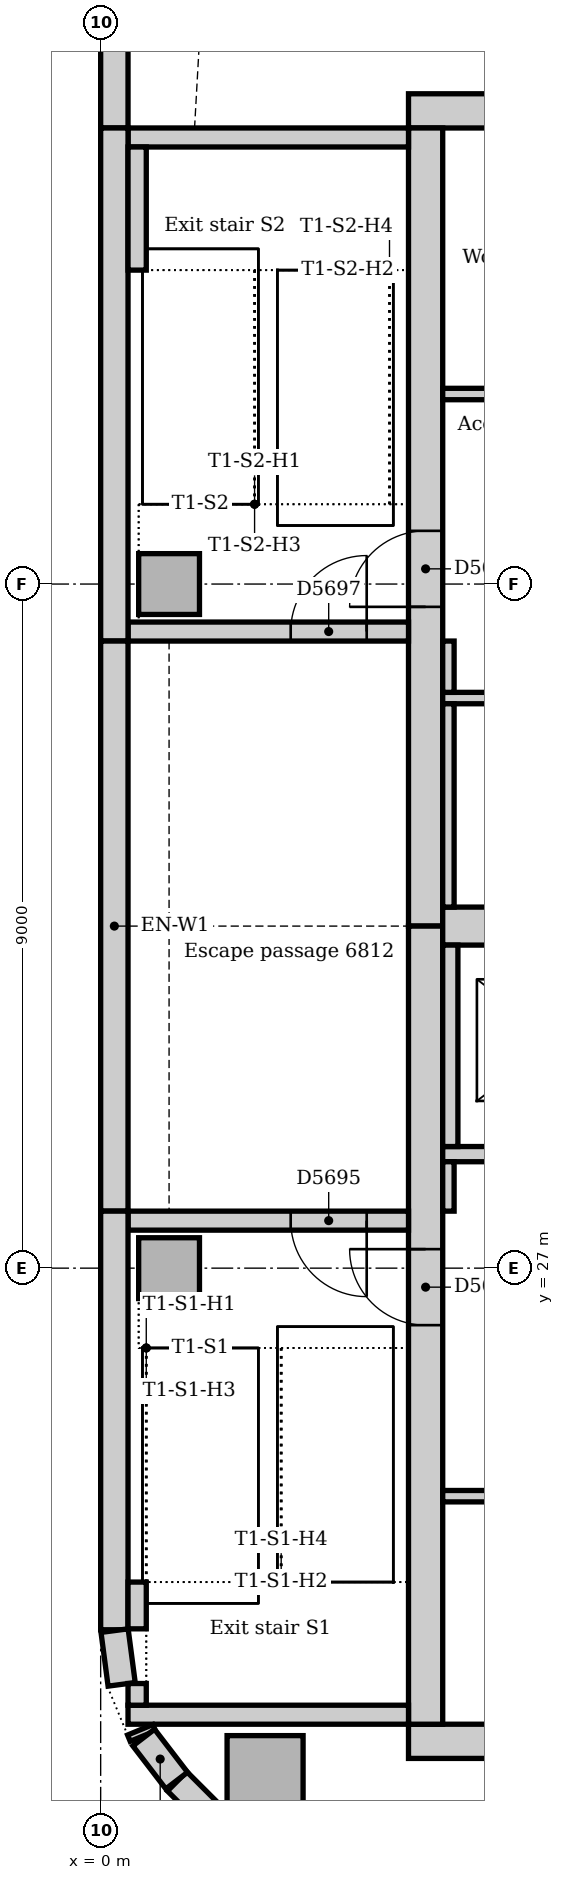
"""IFC4 building model, lengths in metres.
Left out: names, types, materials, properties, quantities, classifications, styles, units other than length and angle.
Written with IfcOpenShell. Run it as: python <this file> out.ifc"""

import sys

from ifc_helpers import new_model, si_unit, direction, frame, frame_2d, origin, origin_2d, place, context, subcontext, project, spatial, rectangle, extrude, element, fill, save


model = new_model("IFC4")
c1 = context("Model", 3, precision=1e-05, world=origin(), true_north=direction((0.0, 1.0)))
c2 = subcontext(c1, "Body", "Model", "MODEL_VIEW")
j1 = project(units=[si_unit("LENGTHUNIT", "METRE"), si_unit("PLANEANGLEUNIT", "RADIAN")], contexts=[c1])
p1 = place(None, origin())
s1 = spatial("IfcSite", under=j1, at=p1, CompositionType="ELEMENT")
p2 = place(p1, origin())
s2 = spatial("IfcBuilding", under=s1, at=p2, CompositionType="ELEMENT")
p3 = place(p2, frame((0.0, 0.0, 283.0)))
s3 = spatial("IfcBuildingStorey", under=s2, at=p3, CompositionType="ELEMENT", Elevation=283.0)
for number, where, z_axis, x_axis in (
    (1, (4.05, 20.775, 0.0), (0.0, 0.0, 1.0), (1.0, 0.0, 0.0)),
    (2, (22.95, 42.225, 0.0), (0.0, 0.0, 1.0), (-1.0, 0.0, 0.0)),
):
    element("IfcWall", number, at=place(p3, frame(where, z_axis=z_axis, x_axis=x_axis)), inside=s3, PredefinedType="SOLIDWALL", context=c2, shape_type="SweptSolid", body=[
        extrude(rectangle(XDim=18.9, YDim=0.45, at=frame_2d((9.45, 0.0))), origin(), (0.0, 0.0, 1.0), 8.0),
    ])
p4 = place(p3, frame((4.275, 42.0, 0.0), z_axis=(0.0, 0.0, 1.0), x_axis=(0.0, -1.0, 0.0)))
e3 = element("IfcWall", 3, at=p4, inside=s3, PredefinedType="SOLIDWALL", context=c2, shape_type="SweptSolid", body=[
    extrude(rectangle(XDim=10.5, YDim=0.45, at=frame_2d((5.25, 0.0))), origin(), (0.0, 0.0, 1.0), 8.0),
])
p5 = place(p4, frame((5.3, 0.0, 0.0)))
e4 = element("IfcOpeningElement", 4, at=p5, cuts=e3, PredefinedType="OPENING", context=c2, shape_type="SweptSolid", body=[
    extrude(rectangle(XDim=1.0, YDim=2.1, at=frame_2d((0.5, 1.05))), frame((0.0, 0.235, 0.0), z_axis=(0.0, -1.0, 0.0), x_axis=(1.0, 0.0, 0.0)), (0.0, 0.0, 1.0), 0.47),
])
p6 = place(p3, frame((4.275, 31.5, 0.0), z_axis=(0.0, 0.0, 1.0), x_axis=(0.0, -1.0, 0.0)))
e5 = element("IfcWall", 5, at=p6, inside=s3, PredefinedType="SOLIDWALL", context=c2, shape_type="SweptSolid", body=[
    extrude(rectangle(XDim=10.5, YDim=0.45, at=frame_2d((5.25, 0.0))), origin(), (0.0, 0.0, 1.0), 8.0),
])
p7 = place(p6, frame((4.25, 0.0, 0.0)))
e6 = element("IfcOpeningElement", 6, at=p7, cuts=e5, PredefinedType="OPENING", context=c2, shape_type="SweptSolid", body=[
    extrude(rectangle(XDim=1.0, YDim=2.1, at=frame_2d((0.5, 1.05))), frame((0.0, 0.235, 0.0), z_axis=(0.0, -1.0, 0.0), x_axis=(1.0, 0.0, 0.0)), (0.0, 0.0, 1.0), 0.47),
])
p8 = place(p3, frame((4.5, 31.5, 0.0), z_axis=(0.0, 0.0, 1.0), x_axis=(1.0, 0.0, 0.0)))
e7 = element("IfcWall", 7, at=p8, inside=s3, PredefinedType="SOLIDWALL", context=c2, shape_type="SweptSolid", body=[
    extrude(rectangle(XDim=18.0, YDim=0.5, at=frame_2d((9.0, 0.0))), origin(), (0.0, 0.0, 1.0), 8.0),
])
p9 = place(p3, frame((0.36, 21.125, 0.0), z_axis=(0.0, 0.0, 1.0), x_axis=(1.0, 0.0, 0.0)))
e8 = element("IfcWall", 8, at=p9, inside=s3, PredefinedType="SOLIDWALL", context=c2, shape_type="SweptSolid", body=[
    extrude(rectangle(XDim=3.69, YDim=0.25, at=frame_2d((1.845, 0.0))), origin(), (0.0, 0.0, 1.0), 8.0),
])
p10 = place(p3, frame((4.05, 27.625, 0.0), z_axis=(0.0, 0.0, 1.0), x_axis=(-1.0, 0.0, 0.0)))
e9 = element("IfcWall", 9, at=p10, inside=s3, PredefinedType="SOLIDWALL", context=c2, shape_type="SweptSolid", body=[
    extrude(rectangle(XDim=3.69, YDim=0.25, at=frame_2d((1.845, 0.0))), origin(), (0.0, 0.0, 1.0), 8.0),
])
p11 = place(p10, frame((0.55, 0.0, 0.0)))
e10 = element("IfcOpeningElement", 10, at=p11, cuts=e9, PredefinedType="OPENING", context=c2, shape_type="SweptSolid", body=[
    extrude(rectangle(XDim=1.0, YDim=2.1, at=frame_2d((0.5, 1.05))), frame((0.0, 0.135, 0.0), z_axis=(0.0, -1.0, 0.0), x_axis=(1.0, 0.0, 0.0)), (0.0, 0.0, 1.0), 0.27),
])
p12 = place(p3, frame((0.36, 35.375, 0.0), z_axis=(0.0, 0.0, 1.0), x_axis=(1.0, 0.0, 0.0)))
e11 = element("IfcWall", 11, at=p12, inside=s3, PredefinedType="SOLIDWALL", context=c2, shape_type="SweptSolid", body=[
    extrude(rectangle(XDim=3.69, YDim=0.25, at=frame_2d((1.845, 0.0))), origin(), (0.0, 0.0, 1.0), 8.0),
])
p13 = place(p12, frame((2.14, 0.0, 0.0)))
e12 = element("IfcOpeningElement", 12, at=p13, cuts=e11, PredefinedType="OPENING", context=c2, shape_type="SweptSolid", body=[
    extrude(rectangle(XDim=1.0, YDim=2.1, at=frame_2d((0.5, 1.05))), frame((0.0, 0.135, 0.0), z_axis=(0.0, -1.0, 0.0), x_axis=(1.0, 0.0, 0.0)), (0.0, 0.0, 1.0), 0.27),
])
p14 = place(p3, frame((4.05, 41.875, 0.0), z_axis=(0.0, 0.0, 1.0), x_axis=(-1.0, 0.0, 0.0)))
e13 = element("IfcWall", 13, at=p14, inside=s3, PredefinedType="SOLIDWALL", context=c2, shape_type="SweptSolid", body=[
    extrude(rectangle(XDim=3.69, YDim=0.25, at=frame_2d((1.845, 0.0))), origin(), (0.0, 0.0, 1.0), 8.0),
])
p15 = place(p3, frame((2.163, 20.35, 0.0), z_axis=(0.0, 0.0, 1.0), x_axis=(1.0, 0.0, 0.0)))
e14 = element("IfcColumn", 14, at=p15, inside=s3, PredefinedType="COLUMN", context=c2, shape_type="SweptSolid", body=[
    extrude(rectangle(XDim=1.0, YDim=1.0, at=origin_2d()), origin(), (0.0, 0.0, 1.0), 7.7),
])
for number, where, z_axis, x_axis in (
    (15, (0.9, 27.0, 0.0), (0.0, 0.0, 1.0), (1.0, 0.0, 0.0)),
    (16, (0.9, 36.0, 0.0), (0.0, 0.0, 1.0), (1.0, 0.0, 0.0)),
):
    element("IfcColumn", number, at=place(p3, frame(where, z_axis=z_axis, x_axis=x_axis)), inside=s3, PredefinedType="COLUMN", context=c2, shape_type="SweptSolid", body=[
        extrude(rectangle(XDim=0.8, YDim=0.8, at=origin_2d()), origin(), (0.0, 0.0, 1.0), 8.0),
    ])
p16 = place(p3, frame((0.18, 58.757, 0.0), z_axis=(0.0, 0.0, 1.0), x_axis=(0.0, -1.0, 0.0)))
e17 = element("IfcWall", 17, at=p16, inside=s3, PredefinedType="STANDARD", context=c2, shape_type="SweptSolid", body=[
    extrude(rectangle(XDim=16.757, YDim=0.36, at=frame_2d((8.379, 0.0))), origin(), (0.0, 0.0, 1.0), 7.7),
])
p17 = place(p16, frame((3.107, 0.0, 0.9)))
e18 = element("IfcOpeningElement", 18, at=p17, cuts=e17, PredefinedType="OPENING", context=c2, shape_type="SweptSolid", body=[
    extrude(rectangle(XDim=3.3, YDim=1.6, at=frame_2d((1.65, 0.8))), frame((0.0, 0.19, 0.0), z_axis=(0.0, -1.0, 0.0), x_axis=(1.0, 0.0, 0.0)), (0.0, 0.0, 1.0), 0.38),
])
p18 = place(p16, frame((7.607, 0.0, 0.9)))
e19 = element("IfcOpeningElement", 19, at=p18, cuts=e17, PredefinedType="OPENING", context=c2, shape_type="SweptSolid", body=[
    extrude(rectangle(XDim=3.3, YDim=1.6, at=frame_2d((1.65, 0.8))), frame((0.0, 0.19, 0.0), z_axis=(0.0, -1.0, 0.0), x_axis=(1.0, 0.0, 0.0)), (0.0, 0.0, 1.0), 0.38),
])
p19 = place(p16, frame((12.107, 0.0, 0.9)))
e20 = element("IfcOpeningElement", 20, at=p19, cuts=e17, PredefinedType="OPENING", context=c2, shape_type="SweptSolid", body=[
    extrude(rectangle(XDim=3.3, YDim=1.6, at=frame_2d((1.65, 0.8))), frame((0.0, 0.19, 0.0), z_axis=(0.0, -1.0, 0.0), x_axis=(1.0, 0.0, 0.0)), (0.0, 0.0, 1.0), 0.38),
])
p20 = place(p3, frame((0.18, 42.0, 0.0), z_axis=(0.0, 0.0, 1.0), x_axis=(0.0, -1.0, 0.0)))
e21 = element("IfcWall", 21, at=p20, inside=s3, PredefinedType="STANDARD", context=c2, shape_type="SweptSolid", body=[
    extrude(rectangle(XDim=6.75, YDim=0.36, at=frame_2d((3.375, 0.0))), origin(), (0.0, 0.0, 1.0), 7.7),
])
p21 = place(p3, frame((0.18, 35.25, 0.0), z_axis=(0.0, 0.0, 1.0), x_axis=(0.0, -1.0, 0.0)))
e22 = element("IfcWall", 22, at=p21, inside=s3, PredefinedType="STANDARD", context=c2, shape_type="SweptSolid", body=[
    extrude(rectangle(XDim=7.5, YDim=0.36, at=frame_2d((3.75, 0.0))), origin(), (0.0, 0.0, 1.0), 7.7),
])
p22 = place(p3, frame((0.18, 27.75, 0.0), z_axis=(0.0, 0.0, 1.0), x_axis=(0.0, -1.0, 0.0)))
e23 = element("IfcWall", 23, at=p22, inside=s3, PredefinedType="STANDARD", context=c2, shape_type="SweptSolid", body=[
    extrude(rectangle(XDim=5.507, YDim=0.36, at=frame_2d((2.754, 0.0))), origin(), (0.0, 0.0, 1.0), 7.7),
])
p23 = place(p3, frame((1.006, 20.249, 0.0), z_axis=(0.0, 0.0, 1.0), x_axis=(0.707106781187, -0.707106781187, 0.0)))
e24 = element("IfcWall", 24, at=p23, inside=s3, PredefinedType="STANDARD", context=c2, shape_type="SweptSolid", body=[
    extrude(rectangle(XDim=1.757, YDim=0.36, at=frame_2d((0.879, 0.0))), origin(), (0.0, 0.0, 1.0), 7.7),
])
p24 = place(p3, frame((0.183, 22.231, 0.0), z_axis=(0.0, 0.0, 1.0), x_axis=(0.13055608231, -0.99144092581, 0.0)))
e25 = element("IfcWall", 25, at=p24, inside=s3, PredefinedType="STANDARD", context=c2, shape_type="SweptSolid", body=[
    extrude(rectangle(XDim=0.713, YDim=0.36, at=frame_2d((0.356, 0.0))), origin(), (0.0, 0.0, 1.0), 7.7),
])
p25 = place(p3, frame((0.521, 20.927, 0.0), z_axis=(0.0, 0.0, 1.0), x_axis=(0.382549378284, -0.923935048136, 0.0)))
e26 = element("IfcWall", 26, at=p25, inside=s3, PredefinedType="STANDARD", context=c2, shape_type="SweptSolid", body=[
    extrude(rectangle(XDim=0.089, YDim=0.36, at=frame_2d((0.045, 0.0))), origin(), (0.0, 0.0, 1.0), 7.7),
])
p26 = place(p3, frame((0.566, 20.825, 0.0), z_axis=(0.0, 0.0, 1.0), x_axis=(0.608802368033, -0.793321924995, 0.0)))
e27 = element("IfcWall", 27, at=p26, inside=s3, PredefinedType="STANDARD", context=c2, shape_type="SweptSolid", body=[
    extrude(rectangle(XDim=0.713, YDim=0.36, at=frame_2d((0.357, 0.0))), origin(), (0.0, 0.0, 1.0), 7.7),
])
p27 = place(p3, frame((0.48, 21.25, 0.0), z_axis=(0.0, 0.0, 1.0), x_axis=(0.0, 1.0, 0.0)))
e28 = element("IfcWall", 28, at=p27, inside=s3, PredefinedType="STANDARD", context=c2, shape_type="SweptSolid", body=[
    extrude(rectangle(XDim=0.285, YDim=0.24, at=frame_2d((0.143, 0.0))), origin(), (0.0, 0.0, 1.0), 8.0),
])
p28 = place(p3, frame((0.48, 22.255, 0.0), z_axis=(0.0, 0.0, 1.0), x_axis=(0.0, 1.0, 0.0)))
e29 = element("IfcWall", 29, at=p28, inside=s3, PredefinedType="STANDARD", context=c2, shape_type="SweptSolid", body=[
    extrude(rectangle(XDim=0.615, YDim=0.24, at=frame_2d((0.307, 0.0))), origin(), (0.0, 0.0, 1.0), 8.0),
])
p29 = place(p3, frame((0.48, 40.13, 0.0), z_axis=(0.0, 0.0, 1.0), x_axis=(0.0, 1.0, 0.0)))
e30 = element("IfcWall", 30, at=p29, inside=s3, PredefinedType="STANDARD", context=c2, shape_type="SweptSolid", body=[
    extrude(rectangle(XDim=1.62, YDim=0.24, at=frame_2d((0.81, 0.0))), origin(), (0.0, 0.0, 1.0), 8.0),
])
p30 = place(p3, frame((4.5, 28.5, 0.0), z_axis=(0.0, 0.0, 1.0), x_axis=(1.0, 0.0, 0.0)))
e31 = element("IfcWall", 31, at=p30, inside=s3, PredefinedType="PARTITIONING", context=c2, shape_type="SweptSolid", body=[
    extrude(rectangle(XDim=18.0, YDim=0.2, at=frame_2d((9.0, 0.0))), origin(), (0.0, 0.0, 1.0), 7.7),
])
p31 = place(p30, frame((0.95, 0.0, 0.0)))
e32 = element("IfcOpeningElement", 32, at=p31, cuts=e31, PredefinedType="OPENING", context=c2, shape_type="SweptSolid", body=[
    extrude(rectangle(XDim=1.1, YDim=2.1, at=frame_2d((0.55, 1.05))), frame((0.0, 0.11, 0.0), z_axis=(0.0, -1.0, 0.0), x_axis=(1.0, 0.0, 0.0)), (0.0, 0.0, 1.0), 0.22),
])
p32 = place(p30, frame((3.95, 0.0, 0.0)))
e33 = element("IfcOpeningElement", 33, at=p32, cuts=e31, PredefinedType="OPENING", context=c2, shape_type="SweptSolid", body=[
    extrude(rectangle(XDim=1.1, YDim=2.1, at=frame_2d((0.55, 1.05))), frame((0.0, 0.11, 0.0), z_axis=(0.0, -1.0, 0.0), x_axis=(1.0, 0.0, 0.0)), (0.0, 0.0, 1.0), 0.22),
])
p33 = place(p30, frame((6.95, 0.0, 0.0)))
e34 = element("IfcOpeningElement", 34, at=p33, cuts=e31, PredefinedType="OPENING", context=c2, shape_type="SweptSolid", body=[
    extrude(rectangle(XDim=1.1, YDim=2.1, at=frame_2d((0.55, 1.05))), frame((0.0, 0.11, 0.0), z_axis=(0.0, -1.0, 0.0), x_axis=(1.0, 0.0, 0.0)), (0.0, 0.0, 1.0), 0.22),
])
p34 = place(p30, frame((9.95, 0.0, 0.0)))
e35 = element("IfcOpeningElement", 35, at=p34, cuts=e31, PredefinedType="OPENING", context=c2, shape_type="SweptSolid", body=[
    extrude(rectangle(XDim=1.1, YDim=2.1, at=frame_2d((0.55, 1.05))), frame((0.0, 0.11, 0.0), z_axis=(0.0, -1.0, 0.0), x_axis=(1.0, 0.0, 0.0)), (0.0, 0.0, 1.0), 0.22),
])
p35 = place(p30, frame((12.95, 0.0, 0.0)))
e36 = element("IfcOpeningElement", 36, at=p35, cuts=e31, PredefinedType="OPENING", context=c2, shape_type="SweptSolid", body=[
    extrude(rectangle(XDim=1.1, YDim=2.1, at=frame_2d((0.55, 1.05))), frame((0.0, 0.11, 0.0), z_axis=(0.0, -1.0, 0.0), x_axis=(1.0, 0.0, 0.0)), (0.0, 0.0, 1.0), 0.22),
])
p36 = place(p30, frame((15.95, 0.0, 0.0)))
e37 = element("IfcOpeningElement", 37, at=p36, cuts=e31, PredefinedType="OPENING", context=c2, shape_type="SweptSolid", body=[
    extrude(rectangle(XDim=1.1, YDim=2.1, at=frame_2d((0.55, 1.05))), frame((0.0, 0.11, 0.0), z_axis=(0.0, -1.0, 0.0), x_axis=(1.0, 0.0, 0.0)), (0.0, 0.0, 1.0), 0.22),
])
p37 = place(p3, frame((4.6, 28.6, 0.0), z_axis=(0.0, 0.0, 1.0), x_axis=(0.0, 1.0, 0.0)))
e38 = element("IfcWall", 38, at=p37, inside=s3, PredefinedType="PARTITIONING", context=c2, shape_type="SweptSolid", body=[
    extrude(rectangle(XDim=2.65, YDim=0.2, at=frame_2d((1.325, 0.0))), origin(), (0.0, 0.0, 1.0), 7.7),
])
p38 = place(p3, frame((4.5, 24.0, 0.0), z_axis=(0.0, 0.0, 1.0), x_axis=(1.0, 0.0, 0.0)))
e39 = element("IfcWall", 39, at=p38, inside=s3, PredefinedType="PARTITIONING", context=c2, shape_type="SweptSolid", body=[
    extrude(rectangle(XDim=18.0, YDim=0.15, at=frame_2d((9.0, 0.0))), origin(), (0.0, 0.0, 1.0), 7.7),
])
p39 = place(p38, frame((1.85, 0.0, 0.0)))
e40 = element("IfcOpeningElement", 40, at=p39, cuts=e39, PredefinedType="OPENING", context=c2, shape_type="SweptSolid", body=[
    extrude(rectangle(XDim=0.9, YDim=2.1, at=frame_2d((0.45, 1.05))), frame((0.0, 0.085, 0.0), z_axis=(0.0, -1.0, 0.0), x_axis=(1.0, 0.0, 0.0)), (0.0, 0.0, 1.0), 0.17),
])
p40 = place(p38, frame((6.3, 0.0, 0.0)))
e41 = element("IfcOpeningElement", 41, at=p40, cuts=e39, PredefinedType="OPENING", context=c2, shape_type="SweptSolid", body=[
    extrude(rectangle(XDim=0.9, YDim=2.1, at=frame_2d((0.45, 1.05))), frame((0.0, 0.085, 0.0), z_axis=(0.0, -1.0, 0.0), x_axis=(1.0, 0.0, 0.0)), (0.0, 0.0, 1.0), 0.17),
])
p41 = place(p38, frame((12.95, 0.0, 0.0)))
e42 = element("IfcOpeningElement", 42, at=p41, cuts=e39, PredefinedType="OPENING", context=c2, shape_type="SweptSolid", body=[
    extrude(rectangle(XDim=0.9, YDim=2.1, at=frame_2d((0.45, 1.05))), frame((0.0, 0.085, 0.0), z_axis=(0.0, -1.0, 0.0), x_axis=(1.0, 0.0, 0.0)), (0.0, 0.0, 1.0), 0.17),
])
p42 = place(p3, frame((4.5, 38.5, 0.0), z_axis=(0.0, 0.0, 1.0), x_axis=(1.0, 0.0, 0.0)))
e43 = element("IfcWall", 43, at=p42, inside=s3, PredefinedType="PARTITIONING", context=c2, shape_type="SweptSolid", body=[
    extrude(rectangle(XDim=11.9, YDim=0.15, at=frame_2d((5.95, 0.0))), origin(), (0.0, 0.0, 1.0), 7.7),
])
p43 = place(p42, frame((1.1, 0.0, 0.0)))
e44 = element("IfcOpeningElement", 44, at=p43, cuts=e43, PredefinedType="OPENING", context=c2, shape_type="SweptSolid", body=[
    extrude(rectangle(XDim=0.9, YDim=2.1, at=frame_2d((0.45, 1.05))), frame((0.0, 0.085, 0.0), z_axis=(0.0, -1.0, 0.0), x_axis=(1.0, 0.0, 0.0)), (0.0, 0.0, 1.0), 0.17),
])
p44 = place(p42, frame((4.05, 0.0, 0.0)))
e45 = element("IfcOpeningElement", 45, at=p44, cuts=e43, PredefinedType="OPENING", context=c2, shape_type="SweptSolid", body=[
    extrude(rectangle(XDim=0.9, YDim=2.1, at=frame_2d((0.45, 1.05))), frame((0.0, 0.085, 0.0), z_axis=(0.0, -1.0, 0.0), x_axis=(1.0, 0.0, 0.0)), (0.0, 0.0, 1.0), 0.17),
])
p45 = place(p42, frame((7.05, 0.0, 0.0)))
e46 = element("IfcOpeningElement", 46, at=p45, cuts=e43, PredefinedType="OPENING", context=c2, shape_type="SweptSolid", body=[
    extrude(rectangle(XDim=0.9, YDim=2.1, at=frame_2d((0.45, 1.05))), frame((0.0, 0.085, 0.0), z_axis=(0.0, -1.0, 0.0), x_axis=(1.0, 0.0, 0.0)), (0.0, 0.0, 1.0), 0.17),
])
p46 = place(p42, frame((9.95, 0.0, 0.0)))
e47 = element("IfcOpeningElement", 47, at=p46, cuts=e43, PredefinedType="OPENING", context=c2, shape_type="SweptSolid", body=[
    extrude(rectangle(XDim=0.8, YDim=2.1, at=frame_2d((0.4, 1.05))), frame((0.0, 0.085, 0.0), z_axis=(0.0, -1.0, 0.0), x_axis=(1.0, 0.0, 0.0)), (0.0, 0.0, 1.0), 0.17),
])
p47 = place(p3, frame((4.5, 34.5, 0.0), z_axis=(0.0, 0.0, 1.0), x_axis=(1.0, 0.0, 0.0)))
e48 = element("IfcWall", 48, at=p47, inside=s3, PredefinedType="PARTITIONING", context=c2, shape_type="SweptSolid", body=[
    extrude(rectangle(XDim=5.9, YDim=0.15, at=frame_2d((2.95, 0.0))), origin(), (0.0, 0.0, 1.0), 7.7),
])
p48 = place(p47, frame((2.5, 0.0, 0.0)))
e49 = element("IfcOpeningElement", 49, at=p48, cuts=e48, PredefinedType="OPENING", context=c2, shape_type="SweptSolid", body=[
    extrude(rectangle(XDim=0.9, YDim=2.1, at=frame_2d((0.45, 1.05))), frame((0.0, 0.085, 0.0), z_axis=(0.0, -1.0, 0.0), x_axis=(1.0, 0.0, 0.0)), (0.0, 0.0, 1.0), 0.17),
])
p49 = place(p3, frame((4.575, 34.575, 0.0), z_axis=(0.0, 0.0, 1.0), x_axis=(0.0, 1.0, 0.0)))
e50 = element("IfcWall", 50, at=p49, inside=s3, PredefinedType="PARTITIONING", context=c2, shape_type="SweptSolid", body=[
    extrude(rectangle(XDim=0.675, YDim=0.15, at=frame_2d((0.338, 0.0))), origin(), (0.0, 0.0, 1.0), 7.7),
])
p50 = place(p3, frame((4.575, 31.75, 0.0), z_axis=(0.0, 0.0, 1.0), x_axis=(0.0, 1.0, 0.0)))
e51 = element("IfcWall", 51, at=p50, inside=s3, PredefinedType="PARTITIONING", context=c2, shape_type="SweptSolid", body=[
    extrude(rectangle(XDim=2.675, YDim=0.15, at=frame_2d((1.337, 0.0))), origin(), (0.0, 0.0, 1.0), 7.7),
])
p51 = place(p3, frame((4.575, 27.75, 0.0), z_axis=(0.0, 0.0, 1.0), x_axis=(0.0, 1.0, 0.0)))
e52 = element("IfcWall", 52, at=p51, inside=s3, PredefinedType="PARTITIONING", context=c2, shape_type="SweptSolid", body=[
    extrude(rectangle(XDim=0.65, YDim=0.15, at=frame_2d((0.325, 0.0))), origin(), (0.0, 0.0, 1.0), 7.7),
])
p52 = place(p7, frame((1.0, 0.0, 0.0), z_axis=(0.0, 0.0, 1.0), x_axis=(-1.0, 0.0, 0.0)))
e53 = element("IfcDoor", 53, at=p52, inside=s3, OperationType="SINGLE_SWING_RIGHT", PredefinedType="DOOR", context=c2, shape_type="SweptSolid", body=[
    extrude(rectangle(XDim=1.0, YDim=2.1, at=frame_2d((0.5, 1.05))), frame((0.0, 0.025, 0.0), z_axis=(0.0, -1.0, 0.0), x_axis=(1.0, 0.0, 0.0)), (0.0, 0.0, 1.0), 0.05),
])
fill(e6, e53)
p53 = place(p11, origin())
e54 = element("IfcDoor", 54, at=p53, inside=s3, OperationType="SINGLE_SWING_LEFT", PredefinedType="DOOR", context=c2, shape_type="SweptSolid", body=[
    extrude(rectangle(XDim=1.0, YDim=2.1, at=frame_2d((0.5, 1.05))), frame((0.0, 0.025, 0.0), z_axis=(0.0, -1.0, 0.0), x_axis=(1.0, 0.0, 0.0)), (0.0, 0.0, 1.0), 0.05),
])
fill(e10, e54)
p54 = place(p5, frame((1.0, 0.0, 0.0), z_axis=(0.0, 0.0, 1.0), x_axis=(-1.0, 0.0, 0.0)))
e55 = element("IfcDoor", 55, at=p54, inside=s3, OperationType="SINGLE_SWING_LEFT", PredefinedType="DOOR", context=c2, shape_type="SweptSolid", body=[
    extrude(rectangle(XDim=1.0, YDim=2.1, at=frame_2d((0.5, 1.05))), frame((0.0, 0.025, 0.0), z_axis=(0.0, -1.0, 0.0), x_axis=(1.0, 0.0, 0.0)), (0.0, 0.0, 1.0), 0.05),
])
fill(e4, e55)
p55 = place(p13, origin())
e56 = element("IfcDoor", 56, at=p55, inside=s3, OperationType="SINGLE_SWING_RIGHT", PredefinedType="DOOR", context=c2, shape_type="SweptSolid", body=[
    extrude(rectangle(XDim=1.0, YDim=2.1, at=frame_2d((0.5, 1.05))), frame((0.0, 0.025, 0.0), z_axis=(0.0, -1.0, 0.0), x_axis=(1.0, 0.0, 0.0)), (0.0, 0.0, 1.0), 0.05),
])
fill(e12, e56)
save(model, sys.argv[1])
